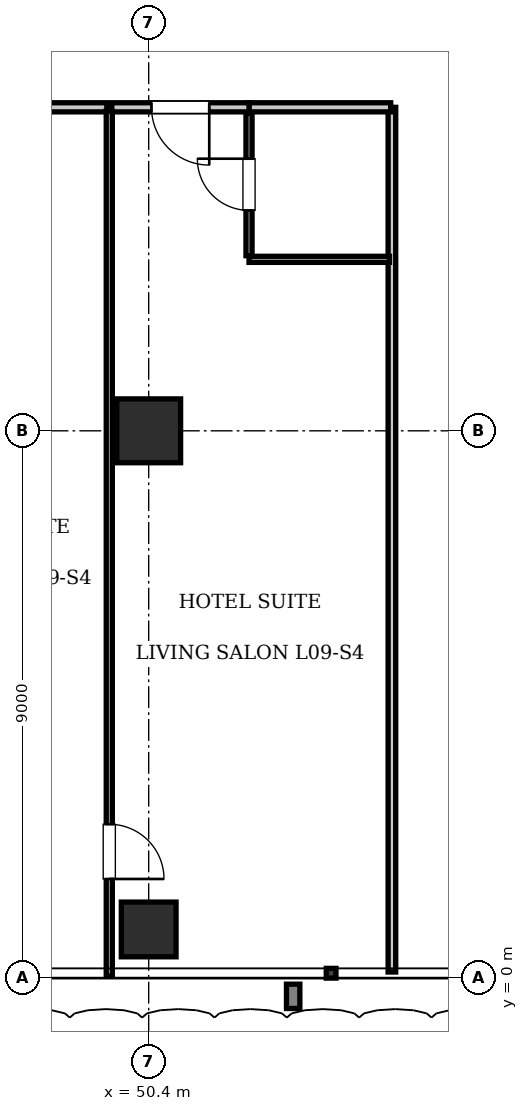
"""IFC4 building model, lengths in metres.
Left out: names, types, materials, properties, quantities, classifications, styles, units other than length and angle.
Written with IfcOpenShell. Run it as: python <this file> out.ifc"""

import sys

from ifc_helpers import new_model, si_unit, direction, frame, frame_2d, origin, origin_2d, place, context, subcontext, project, spatial, rectangle, extrude, element, fill, save


model = new_model("IFC4")
c1 = context("Model", 3, precision=1e-05, world=origin(), true_north=direction((0.0, 1.0)))
c2 = subcontext(c1, "Body", "Model", "MODEL_VIEW")
j1 = project(units=[si_unit("LENGTHUNIT", "METRE"), si_unit("PLANEANGLEUNIT", "RADIAN")], contexts=[c1])
p1 = place(None, origin())
s1 = spatial("IfcSite", under=j1, at=p1, CompositionType="ELEMENT")
p2 = place(p1, origin())
s2 = spatial("IfcBuilding", under=s1, at=p2, CompositionType="ELEMENT")
p3 = place(p2, frame((0.0, 0.0, 42.35)))
s3 = spatial("IfcBuildingStorey", under=s2, at=p3, CompositionType="ELEMENT", Elevation=42.35)
p4 = place(p3, frame((50.4, 9.0, 0.0), z_axis=(0.0, 0.0, 1.0), x_axis=(1.0, 0.0, 0.0)))
e1 = element("IfcColumn", 1, at=p4, inside=s3, PredefinedType="COLUMN", context=c2, shape_type="SweptSolid", body=[
    extrude(rectangle(XDim=1.05, YDim=1.05, at=origin_2d()), origin(), (0.0, 0.0, 1.0), 3.85),
])
p5 = place(p3, frame((50.4, 0.8, 0.0), z_axis=(0.0, 0.0, 1.0), x_axis=(1.0, 0.0, 0.0)))
e2 = element("IfcColumn", 2, at=p5, inside=s3, PredefinedType="COLUMN", context=c2, shape_type="SweptSolid", body=[
    extrude(rectangle(XDim=0.9, YDim=0.9, at=origin_2d()), origin(), (0.0, 0.0, 1.0), 3.85),
])
p6 = place(p3, frame((54.4, 0.1, 0.0), z_axis=(0.0, 0.0, 1.0), x_axis=(0.0, 1.0, 0.0)))
e3 = element("IfcWall", 3, at=p6, inside=s3, PredefinedType="PARTITIONING", context=c2, shape_type="SweptSolid", body=[
    extrude(rectangle(XDim=14.22, YDim=0.125, at=frame_2d((7.11, 0.0))), origin(), (0.0, 0.0, 1.0), 3.61),
])
p7 = place(p3, frame((52.05, 14.32, 0.0), z_axis=(0.0, 0.0, 1.0), x_axis=(1.0, 0.0, 0.0)))
e4 = element("IfcWall", 4, at=p7, inside=s3, PredefinedType="PARTITIONING", context=c2, shape_type="SweptSolid", body=[
    extrude(rectangle(XDim=2.33, YDim=0.15, at=frame_2d((1.165, 0.0))), origin(), (0.0, 0.0, 1.0), 3.61),
])
p8 = place(p3, frame((52.05, 11.82, 0.0), z_axis=(0.0, 0.0, 1.0), x_axis=(1.0, 0.0, 0.0)))
e5 = element("IfcWall", 5, at=p8, inside=s3, PredefinedType="PARTITIONING", context=c2, shape_type="SweptSolid", body=[
    extrude(rectangle(XDim=2.31, YDim=0.1, at=frame_2d((1.155, 0.0))), origin(), (0.0, 0.0, 1.0), 3.61),
])
p9 = place(p3, frame((52.05, 11.88, 0.0), z_axis=(0.0, 0.0, 1.0), x_axis=(0.0, 1.0, 0.0)))
e6 = element("IfcWall", 6, at=p9, inside=s3, PredefinedType="PARTITIONING", context=c2, shape_type="SweptSolid", body=[
    extrude(rectangle(XDim=2.34, YDim=0.1, at=frame_2d((1.17, 0.0))), origin(), (0.0, 0.0, 1.0), 3.61),
])
p10 = place(p9, frame((0.745, 0.0, 0.0)))
e7 = element("IfcOpeningElement", 7, at=p10, cuts=e6, PredefinedType="OPENING", context=c2, shape_type="SweptSolid", body=[
    extrude(rectangle(XDim=0.85, YDim=2.1, at=frame_2d((0.425, 1.05))), frame((0.0, 0.06, 0.0), z_axis=(0.0, -1.0, 0.0), x_axis=(1.0, 0.0, 0.0)), (0.0, 0.0, 1.0), 0.12),
])
p11 = place(p3, frame((46.12, 14.32, 0.0), z_axis=(0.0, 0.0, 1.0), x_axis=(1.0, 0.0, 0.0)))
e8 = element("IfcWall", 8, at=p11, inside=s3, PredefinedType="PARTITIONING", context=c2, shape_type="SweptSolid", body=[
    extrude(rectangle(XDim=3.592, YDim=0.15, at=frame_2d((1.796, 0.0))), origin(), (0.0, 0.0, 1.0), 3.61),
])
p12 = place(p3, frame((49.792, 14.32, 0.0), z_axis=(0.0, 0.0, 1.0), x_axis=(1.0, 0.0, 0.0)))
e9 = element("IfcWall", 9, at=p12, inside=s3, PredefinedType="PARTITIONING", context=c2, shape_type="SweptSolid", body=[
    extrude(rectangle(XDim=2.258, YDim=0.15, at=frame_2d((1.129, 0.0))), origin(), (0.0, 0.0, 1.0), 3.61),
])
p13 = place(p12, frame((0.654, 0.0, 0.0)))
e10 = element("IfcOpeningElement", 10, at=p13, cuts=e9, PredefinedType="OPENING", context=c2, shape_type="SweptSolid", body=[
    extrude(rectangle(XDim=0.95, YDim=2.15, at=frame_2d((0.475, 1.075))), frame((0.0, 0.085, 0.0), z_axis=(0.0, -1.0, 0.0), x_axis=(1.0, 0.0, 0.0)), (0.0, 0.0, 1.0), 0.17),
])
p14 = place(p3, frame((49.752, 0.03, 0.0), z_axis=(0.0, 0.0, 1.0), x_axis=(0.0, 1.0, 0.0)))
e11 = element("IfcWall", 11, at=p14, inside=s3, PredefinedType="PARTITIONING", context=c2, shape_type="SweptSolid", body=[
    extrude(rectangle(XDim=14.23, YDim=0.1, at=frame_2d((7.115, 0.0))), origin(), (0.0, 0.0, 1.0), 3.61),
])
p15 = place(p14, frame((1.6, 0.0, 0.0)))
e12 = element("IfcOpeningElement", 12, at=p15, cuts=e11, PredefinedType="OPENING", context=c2, shape_type="SweptSolid", body=[
    extrude(rectangle(XDim=0.9, YDim=2.1, at=frame_2d((0.45, 1.05))), frame((0.0, 0.06, 0.0), z_axis=(0.0, -1.0, 0.0), x_axis=(1.0, 0.0, 0.0)), (0.0, 0.0, 1.0), 0.12),
])
p16 = place(p10, origin())
e13 = element("IfcDoor", 13, at=p16, inside=s3, OperationType="SINGLE_SWING_RIGHT", PredefinedType="DOOR", context=c2, shape_type="SweptSolid", body=[
    extrude(rectangle(XDim=0.85, YDim=2.1, at=frame_2d((0.425, 1.05))), frame((0.0, 0.025, 0.0), z_axis=(0.0, -1.0, 0.0), x_axis=(1.0, 0.0, 0.0)), (0.0, 0.0, 1.0), 0.05),
])
fill(e7, e13)
p17 = place(p13, frame((0.95, 0.0, 0.0), z_axis=(0.0, 0.0, 1.0), x_axis=(-1.0, 0.0, 0.0)))
e14 = element("IfcDoor", 14, at=p17, inside=s3, OperationType="SINGLE_SWING_LEFT", PredefinedType="DOOR", context=c2, shape_type="SweptSolid", body=[
    extrude(rectangle(XDim=0.95, YDim=2.15, at=frame_2d((0.475, 1.075))), frame((0.0, 0.025, 0.0), z_axis=(0.0, -1.0, 0.0), x_axis=(1.0, 0.0, 0.0)), (0.0, 0.0, 1.0), 0.05),
])
fill(e10, e14)
p18 = place(p15, frame((0.9, 0.0, 0.0), z_axis=(0.0, 0.0, 1.0), x_axis=(-1.0, 0.0, 0.0)))
e15 = element("IfcDoor", 15, at=p18, inside=s3, OperationType="SINGLE_SWING_RIGHT", PredefinedType="DOOR", context=c2, shape_type="SweptSolid", body=[
    extrude(rectangle(XDim=0.9, YDim=2.1, at=frame_2d((0.45, 1.05))), frame((0.0, 0.025, 0.0), z_axis=(0.0, -1.0, 0.0), x_axis=(1.0, 0.0, 0.0)), (0.0, 0.0, 1.0), 0.05),
])
fill(e12, e15)
save(model, sys.argv[1])
